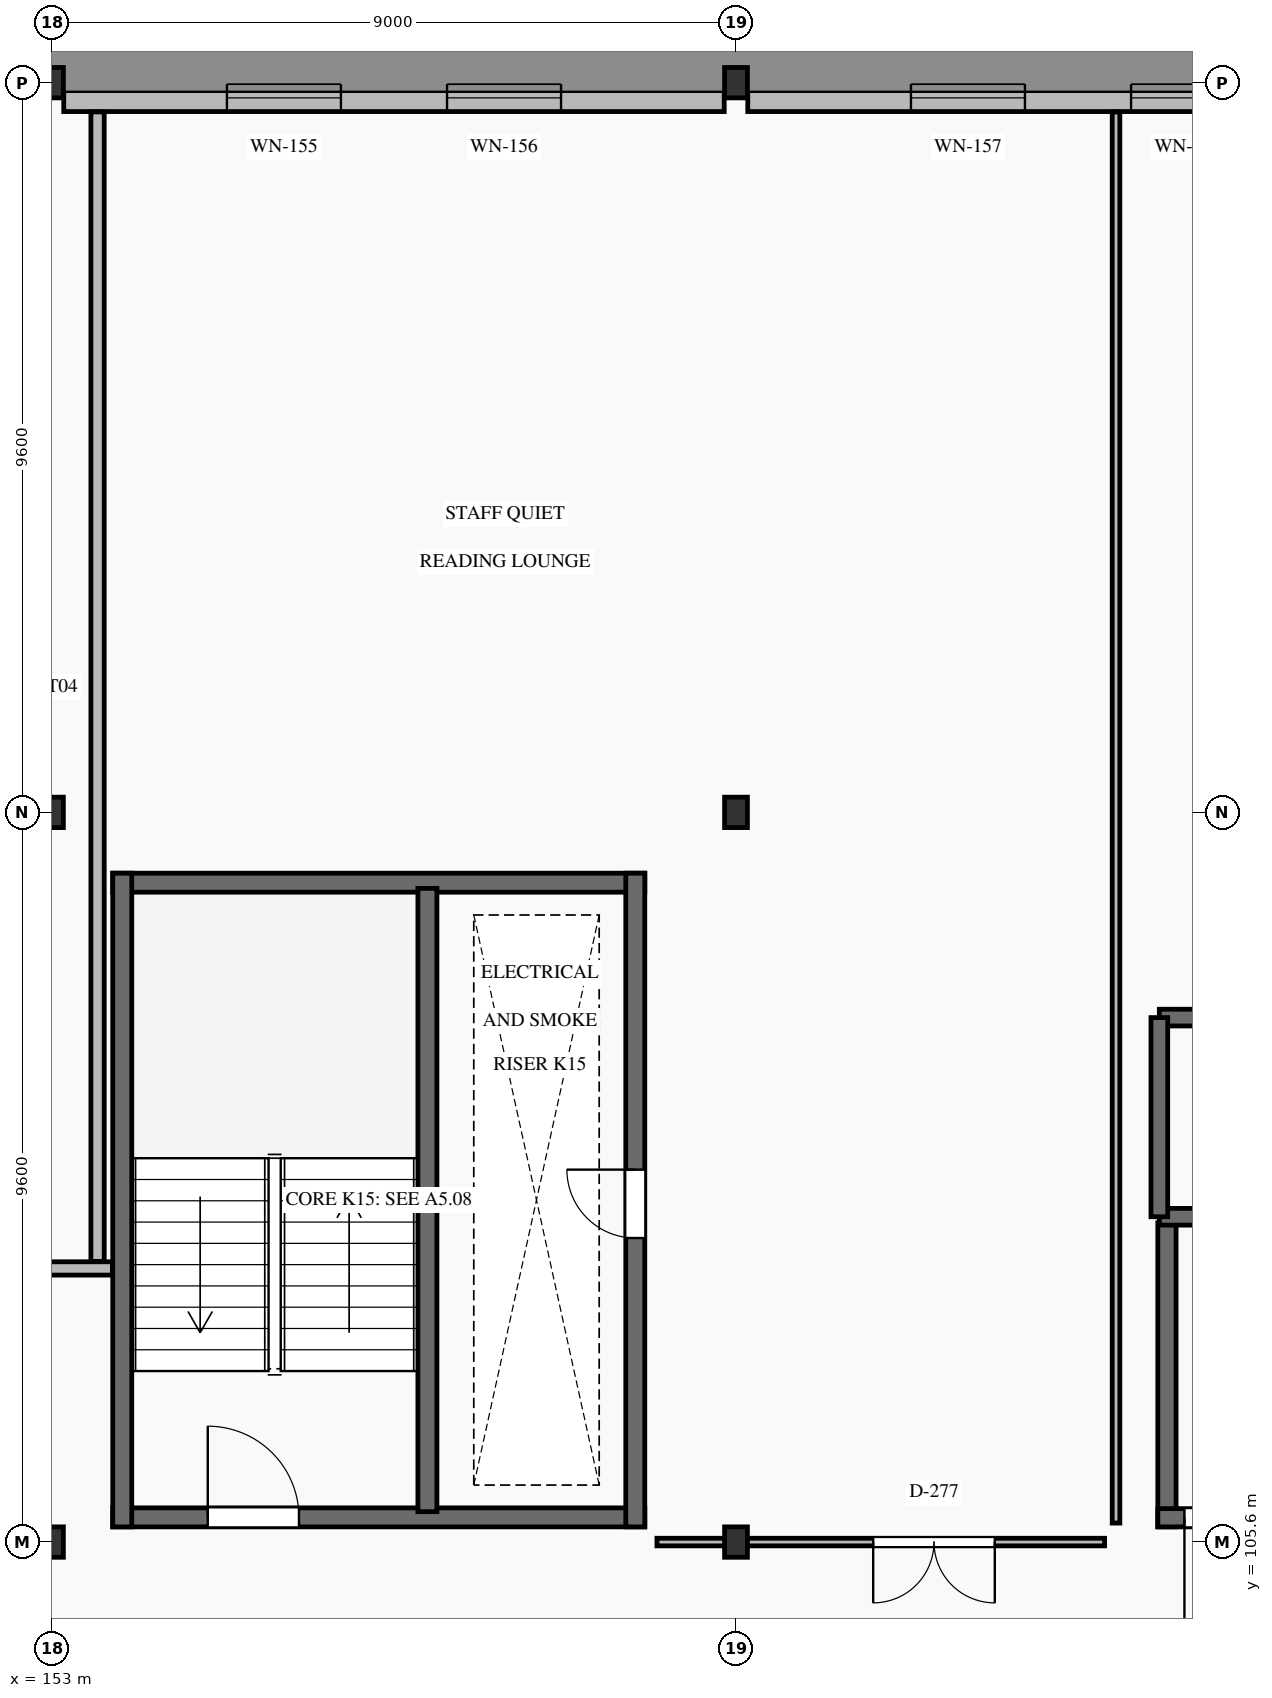
"""IFC4 building model, lengths in metres.
Left out: names, types, materials, properties, quantities, classifications, styles, units other than length and angle.
Written with IfcOpenShell. Run it as: python <this file> out.ifc"""

import sys

from ifc_helpers import new_model, si_unit, direction, frame, frame_2d, origin, origin_2d, place, context, subcontext, project, spatial, rectangle, i_section, extrude, element, fill, save


model = new_model("IFC4")
c1 = context("Model", 3, precision=1e-05, world=origin(), true_north=direction((0.0, 1.0)))
c2 = subcontext(c1, "Body", "Model", "MODEL_VIEW")
j1 = project(units=[si_unit("LENGTHUNIT", "METRE"), si_unit("PLANEANGLEUNIT", "RADIAN")], contexts=[c1])
p1 = place(None, origin())
s1 = spatial("IfcSite", under=j1, at=p1, CompositionType="ELEMENT")
p2 = place(p1, origin())
s2 = spatial("IfcBuilding", under=s1, at=p2, CompositionType="ELEMENT")
p3 = place(p2, frame((0.0, 0.0, 15.0)))
s3 = spatial("IfcBuildingStorey", under=s2, at=p3, CompositionType="ELEMENT", Elevation=15.0)
for number, where, z_axis, x_axis in (
    (1, (153.0, 105.6, 0.0), (0.0, 0.0, 1.0), (1.0, 0.0, 0.0)),
    (2, (153.0, 115.2, 0.0), (0.0, 0.0, 1.0), (1.0, 0.0, 0.0)),
    (3, (153.0, 124.8, 0.0), (0.0, 0.0, 1.0), (1.0, 0.0, 0.0)),
    (4, (162.0, 105.6, 0.0), (0.0, 0.0, 1.0), (1.0, 0.0, 0.0)),
    (5, (162.0, 115.2, 0.0), (0.0, 0.0, 1.0), (1.0, 0.0, 0.0)),
    (6, (162.0, 124.8, 0.0), (0.0, 0.0, 1.0), (1.0, 0.0, 0.0)),
):
    element("IfcColumn", number, at=place(p3, frame(where, z_axis=z_axis, x_axis=x_axis)), inside=s3, PredefinedType="COLUMN", context=c2, shape_type="SweptSolid", body=[
        extrude(i_section(OverallWidth=0.3, OverallDepth=0.4, WebThickness=0.013, FlangeThickness=0.024, FilletRadius=0.027, at=origin_2d()), origin(), (0.0, 0.0, 1.0), 3.9),
    ])
p4 = place(p3, frame((153.155, 124.6, 0.0), z_axis=(0.0, 0.0, 1.0), x_axis=(1.0, 0.0, 0.0)))
e7 = element("IfcWall", 7, at=p4, inside=s3, PredefinedType="SOLIDWALL", context=c2, shape_type="SweptSolid", body=[
    extrude(rectangle(XDim=8.69, YDim=0.36, at=frame_2d((4.345, 0.0))), origin(), (0.0, 0.0, 1.0), 3.36),
])
p5 = place(p4, frame((2.147, 0.0, 0.95)))
e8 = element("IfcOpeningElement", 8, at=p5, cuts=e7, PredefinedType="OPENING", context=c2, shape_type="SweptSolid", body=[
    extrude(rectangle(XDim=1.5, YDim=2.1, at=frame_2d((0.75, 1.05))), frame((0.0, 0.195, 0.0), z_axis=(0.0, -1.0, 0.0), x_axis=(1.0, 0.0, 0.0)), (0.0, 0.0, 1.0), 0.39),
])
p6 = place(p4, frame((5.043, 0.0, 0.95)))
e9 = element("IfcOpeningElement", 9, at=p6, cuts=e7, PredefinedType="OPENING", context=c2, shape_type="SweptSolid", body=[
    extrude(rectangle(XDim=1.5, YDim=2.1, at=frame_2d((0.75, 1.05))), frame((0.0, 0.195, 0.0), z_axis=(0.0, -1.0, 0.0), x_axis=(1.0, 0.0, 0.0)), (0.0, 0.0, 1.0), 0.39),
])
p7 = place(p3, frame((162.155, 124.6, 0.0), z_axis=(0.0, 0.0, 1.0), x_axis=(1.0, 0.0, 0.0)))
e10 = element("IfcWall", 10, at=p7, inside=s3, PredefinedType="SOLIDWALL", context=c2, shape_type="SweptSolid", body=[
    extrude(rectangle(XDim=8.69, YDim=0.36, at=frame_2d((4.345, 0.0))), origin(), (0.0, 0.0, 1.0), 3.36),
])
p8 = place(p7, frame((2.147, 0.0, 0.95)))
e11 = element("IfcOpeningElement", 11, at=p8, cuts=e10, PredefinedType="OPENING", context=c2, shape_type="SweptSolid", body=[
    extrude(rectangle(XDim=1.5, YDim=2.1, at=frame_2d((0.75, 1.05))), frame((0.0, 0.195, 0.0), z_axis=(0.0, -1.0, 0.0), x_axis=(1.0, 0.0, 0.0)), (0.0, 0.0, 1.0), 0.39),
])
p9 = place(p7, frame((5.043, 0.0, 0.95)))
e12 = element("IfcOpeningElement", 12, at=p9, cuts=e10, PredefinedType="OPENING", context=c2, shape_type="SweptSolid", body=[
    extrude(rectangle(XDim=1.5, YDim=2.1, at=frame_2d((0.75, 1.05))), frame((0.0, 0.195, 0.0), z_axis=(0.0, -1.0, 0.0), x_axis=(1.0, 0.0, 0.0)), (0.0, 0.0, 1.0), 0.39),
])
p10 = place(p3, frame((167.67, 105.8, 0.0), z_axis=(0.0, 0.0, 1.0), x_axis=(0.0, 1.0, 0.0)))
e13 = element("IfcWall", 13, at=p10, inside=s3, PredefinedType="SHEAR", context=c2, shape_type="SweptSolid", body=[
    extrude(rectangle(XDim=4.0, YDim=0.24, at=frame_2d((2.0, 0.0))), origin(), (0.0, 0.0, 1.0), 3.9),
])
p11 = place(p3, frame((167.55, 105.92, 0.0), z_axis=(0.0, 0.0, 1.0), x_axis=(1.0, 0.0, 0.0)))
e14 = element("IfcWall", 14, at=p11, inside=s3, PredefinedType="SHEAR", context=c2, shape_type="SweptSolid", body=[
    extrude(rectangle(XDim=4.2, YDim=0.24, at=frame_2d((2.1, 0.0))), origin(), (0.0, 0.0, 1.0), 3.9),
])
p12 = place(p11, frame((0.35, 0.0, 0.0)))
e15 = element("IfcOpeningElement", 15, at=p12, cuts=e14, PredefinedType="OPENING", context=c2, shape_type="SweptSolid", body=[
    extrude(rectangle(XDim=1.4, YDim=2.2, at=frame_2d((0.7, 1.1))), frame((0.0, 0.135, 0.0), z_axis=(0.0, -1.0, 0.0), x_axis=(1.0, 0.0, 0.0)), (0.0, 0.0, 1.0), 0.27),
])
p13 = place(p3, frame((153.8, 105.925, 0.0), z_axis=(0.0, 0.0, 1.0), x_axis=(1.0, 0.0, 0.0)))
e16 = element("IfcWall", 16, at=p13, inside=s3, PredefinedType="SHEAR", context=c2, shape_type="SweptSolid", body=[
    extrude(rectangle(XDim=7.0, YDim=0.25, at=frame_2d((3.5, 0.0))), origin(), (0.0, 0.0, 1.0), 3.9),
])
p14 = place(p13, frame((1.25, 0.0, 0.0)))
e17 = element("IfcOpeningElement", 17, at=p14, cuts=e16, PredefinedType="OPENING", context=c2, shape_type="SweptSolid", body=[
    extrude(rectangle(XDim=1.2, YDim=2.15, at=frame_2d((0.6, 1.075))), frame((0.0, 0.14, 0.0), z_axis=(0.0, -1.0, 0.0), x_axis=(1.0, 0.0, 0.0)), (0.0, 0.0, 1.0), 0.28),
])
p15 = place(p3, frame((153.8, 114.275, 0.0), z_axis=(0.0, 0.0, 1.0), x_axis=(1.0, 0.0, 0.0)))
e18 = element("IfcWall", 18, at=p15, inside=s3, PredefinedType="SHEAR", context=c2, shape_type="SweptSolid", body=[
    extrude(rectangle(XDim=7.0, YDim=0.25, at=frame_2d((3.5, 0.0))), origin(), (0.0, 0.0, 1.0), 3.9),
])
p16 = place(p3, frame((153.925, 105.8, 0.0), z_axis=(0.0, 0.0, 1.0), x_axis=(0.0, 1.0, 0.0)))
e19 = element("IfcWall", 19, at=p16, inside=s3, PredefinedType="SHEAR", context=c2, shape_type="SweptSolid", body=[
    extrude(rectangle(XDim=8.6, YDim=0.25, at=frame_2d((4.3, 0.0))), origin(), (0.0, 0.0, 1.0), 3.9),
])
p17 = place(p3, frame((160.675, 105.8, 0.0), z_axis=(0.0, 0.0, 1.0), x_axis=(0.0, 1.0, 0.0)))
e20 = element("IfcWall", 20, at=p17, inside=s3, PredefinedType="SHEAR", context=c2, shape_type="SweptSolid", body=[
    extrude(rectangle(XDim=8.6, YDim=0.25, at=frame_2d((4.3, 0.0))), origin(), (0.0, 0.0, 1.0), 3.9),
])
p18 = place(p17, frame((3.8, 0.0, 0.0)))
e21 = element("IfcOpeningElement", 21, at=p18, cuts=e20, PredefinedType="OPENING", context=c2, shape_type="SweptSolid", body=[
    extrude(rectangle(XDim=0.9, YDim=2.05, at=frame_2d((0.45, 1.025))), frame((0.0, 0.14, 0.0), z_axis=(0.0, -1.0, 0.0), x_axis=(1.0, 0.0, 0.0)), (0.0, 0.0, 1.0), 0.28),
])
p19 = place(p3, frame((157.94, 106.0, 0.0), z_axis=(0.0, 0.0, 1.0), x_axis=(0.0, 1.0, 0.0)))
e22 = element("IfcWall", 22, at=p19, inside=s3, PredefinedType="SHEAR", context=c2, shape_type="SweptSolid", body=[
    extrude(rectangle(XDim=8.2, YDim=0.25, at=frame_2d((4.1, 0.0))), origin(), (0.0, 0.0, 1.0), 3.9),
])
p20 = place(p3, frame((167.57, 109.88, 0.0), z_axis=(0.0, 0.0, 1.0), x_axis=(1.0, 0.0, 0.0)))
e23 = element("IfcWall", 23, at=p20, inside=s3, PredefinedType="SHEAR", context=c2, shape_type="SweptSolid", body=[
    extrude(rectangle(XDim=4.16, YDim=0.22, at=frame_2d((2.08, 0.0))), origin(), (0.0, 0.0, 1.0), 3.9),
])
p21 = place(p20, frame((1.53, 0.0, 0.0)))
e24 = element("IfcOpeningElement", 24, at=p21, cuts=e23, PredefinedType="OPENING", context=c2, shape_type="SweptSolid", body=[
    extrude(rectangle(XDim=1.1, YDim=2.15, at=frame_2d((0.55, 1.075))), frame((0.0, 0.125, 0.0), z_axis=(0.0, -1.0, 0.0), x_axis=(1.0, 0.0, 0.0)), (0.0, 0.0, 1.0), 0.25),
])
p22 = place(p3, frame((167.57, 112.5, 0.0), z_axis=(0.0, 0.0, 1.0), x_axis=(1.0, 0.0, 0.0)))
e25 = element("IfcWall", 25, at=p22, inside=s3, PredefinedType="SHEAR", context=c2, shape_type="SweptSolid", body=[
    extrude(rectangle(XDim=4.16, YDim=0.22, at=frame_2d((2.08, 0.0))), origin(), (0.0, 0.0, 1.0), 3.9),
])
p23 = place(p3, frame((167.57, 109.88, 0.0), z_axis=(0.0, 0.0, 1.0), x_axis=(0.0, 1.0, 0.0)))
e26 = element("IfcWall", 26, at=p23, inside=s3, PredefinedType="SHEAR", context=c2, shape_type="SweptSolid", body=[
    extrude(rectangle(XDim=2.62, YDim=0.22, at=frame_2d((1.31, 0.0))), origin(), (0.0, 0.0, 1.0), 3.9),
])
p24 = place(p3, frame((138.255, 109.2, 0.0), z_axis=(0.0, 0.0, 1.0), x_axis=(1.0, 0.0, 0.0)))
e27 = element("IfcWall", 27, at=p24, inside=s3, PredefinedType="PARTITIONING", context=c2, shape_type="SweptSolid", body=[
    extrude(rectangle(XDim=15.54, YDim=0.175, at=frame_2d((7.77, 0.0))), origin(), (0.0, 0.0, 1.0), 3.64),
])
p25 = place(p24, frame((7.245, 0.0, 0.0)))
e28 = element("IfcOpeningElement", 28, at=p25, cuts=e27, PredefinedType="OPENING", context=c2, shape_type="SweptSolid", body=[
    extrude(rectangle(XDim=1.6, YDim=2.25, at=frame_2d((0.8, 1.125))), frame((0.0, 0.103, 0.0), z_axis=(0.0, -1.0, 0.0), x_axis=(1.0, 0.0, 0.0)), (0.0, 0.0, 1.0), 0.205),
])
p26 = place(p3, frame((160.96, 105.6, 0.0), z_axis=(0.0, 0.0, 1.0), x_axis=(1.0, 0.0, 0.0)))
e29 = element("IfcWall", 29, at=p26, inside=s3, PredefinedType="PARTITIONING", context=c2, shape_type="SweptSolid", body=[
    extrude(rectangle(XDim=5.89, YDim=0.1, at=frame_2d((2.945, 0.0))), origin(), (0.0, 0.0, 1.0), 3.29),
])
p27 = place(p26, frame((2.845, 0.0, 0.0)))
e30 = element("IfcOpeningElement", 30, at=p27, cuts=e29, PredefinedType="OPENING", context=c2, shape_type="SweptSolid", body=[
    extrude(rectangle(XDim=1.6, YDim=2.25, at=frame_2d((0.8, 1.125))), frame((0.0, 0.065, 0.0), z_axis=(0.0, -1.0, 0.0), x_axis=(1.0, 0.0, 0.0)), (0.0, 0.0, 1.0), 0.13),
])
p28 = place(p3, frame((153.6, 109.292, 0.0), z_axis=(0.0, 0.0, 1.0), x_axis=(0.0, 1.0, 0.0)))
e31 = element("IfcWall", 31, at=p28, inside=s3, PredefinedType="PARTITIONING", context=c2, shape_type="SweptSolid", body=[
    extrude(rectangle(XDim=15.123, YDim=0.175, at=frame_2d((7.561, 0.0))), origin(), (0.0, 0.0, 1.0), 3.64),
])
p29 = place(p3, frame((167.0, 105.85, 0.0), z_axis=(0.0, 0.0, 1.0), x_axis=(0.0, 1.0, 0.0)))
e32 = element("IfcWall", 32, at=p29, inside=s3, PredefinedType="PARTITIONING", context=c2, shape_type="SweptSolid", body=[
    extrude(rectangle(XDim=18.565, YDim=0.1, at=frame_2d((9.282, 0.0))), origin(), (0.0, 0.0, 1.0), 3.64),
])
p30 = place(p5, origin())
e33 = element("IfcWindow", 33, at=p30, inside=s3, PartitioningType="SINGLE_PANEL", PredefinedType="WINDOW", context=c2, shape_type="SweptSolid", body=[
    extrude(rectangle(XDim=1.5, YDim=2.1, at=frame_2d((0.75, 1.05))), frame((0.0, 0.03, 0.0), z_axis=(0.0, -1.0, 0.0), x_axis=(1.0, 0.0, 0.0)), (0.0, 0.0, 1.0), 0.06),
])
fill(e8, e33)
p31 = place(p6, origin())
e34 = element("IfcWindow", 34, at=p31, inside=s3, PartitioningType="SINGLE_PANEL", PredefinedType="WINDOW", context=c2, shape_type="SweptSolid", body=[
    extrude(rectangle(XDim=1.5, YDim=2.1, at=frame_2d((0.75, 1.05))), frame((0.0, 0.03, 0.0), z_axis=(0.0, -1.0, 0.0), x_axis=(1.0, 0.0, 0.0)), (0.0, 0.0, 1.0), 0.06),
])
fill(e9, e34)
p32 = place(p8, origin())
e35 = element("IfcWindow", 35, at=p32, inside=s3, PartitioningType="SINGLE_PANEL", PredefinedType="WINDOW", context=c2, shape_type="SweptSolid", body=[
    extrude(rectangle(XDim=1.5, YDim=2.1, at=frame_2d((0.75, 1.05))), frame((0.0, 0.03, 0.0), z_axis=(0.0, -1.0, 0.0), x_axis=(1.0, 0.0, 0.0)), (0.0, 0.0, 1.0), 0.06),
])
fill(e11, e35)
p33 = place(p9, origin())
e36 = element("IfcWindow", 36, at=p33, inside=s3, PartitioningType="SINGLE_PANEL", PredefinedType="WINDOW", context=c2, shape_type="SweptSolid", body=[
    extrude(rectangle(XDim=1.5, YDim=2.1, at=frame_2d((0.75, 1.05))), frame((0.0, 0.03, 0.0), z_axis=(0.0, -1.0, 0.0), x_axis=(1.0, 0.0, 0.0)), (0.0, 0.0, 1.0), 0.06),
])
fill(e12, e36)
p34 = place(p12, frame((1.4, 0.0, 0.0), z_axis=(0.0, 0.0, 1.0), x_axis=(-1.0, 0.0, 0.0)))
e37 = element("IfcDoor", 37, at=p34, inside=s3, OperationType="SINGLE_SWING_LEFT", PredefinedType="DOOR", context=c2, shape_type="SweptSolid", body=[
    extrude(rectangle(XDim=1.4, YDim=2.2, at=frame_2d((0.7, 1.1))), frame((0.0, 0.025, 0.0), z_axis=(0.0, -1.0, 0.0), x_axis=(1.0, 0.0, 0.0)), (0.0, 0.0, 1.0), 0.05),
])
fill(e15, e37)
p35 = place(p14, origin())
e38 = element("IfcDoor", 38, at=p35, inside=s3, OperationType="SINGLE_SWING_LEFT", PredefinedType="DOOR", context=c2, shape_type="SweptSolid", body=[
    extrude(rectangle(XDim=1.2, YDim=2.15, at=frame_2d((0.6, 1.075))), frame((0.0, 0.025, 0.0), z_axis=(0.0, -1.0, 0.0), x_axis=(1.0, 0.0, 0.0)), (0.0, 0.0, 1.0), 0.05),
])
fill(e17, e38)
p36 = place(p18, origin())
e39 = element("IfcDoor", 39, at=p36, inside=s3, OperationType="SINGLE_SWING_RIGHT", PredefinedType="DOOR", context=c2, shape_type="SweptSolid", body=[
    extrude(rectangle(XDim=0.9, YDim=2.05, at=frame_2d((0.45, 1.025))), frame((0.0, 0.025, 0.0), z_axis=(0.0, -1.0, 0.0), x_axis=(1.0, 0.0, 0.0)), (0.0, 0.0, 1.0), 0.05),
])
fill(e21, e39)
p37 = place(p27, frame((1.6, 0.0, 0.0), z_axis=(0.0, 0.0, 1.0), x_axis=(-1.0, 0.0, 0.0)))
e40 = element("IfcDoor", 40, at=p37, inside=s3, OperationType="DOUBLE_DOOR_SINGLE_SWING", PredefinedType="DOOR", context=c2, shape_type="SweptSolid", body=[
    extrude(rectangle(XDim=1.6, YDim=2.25, at=frame_2d((0.8, 1.125))), frame((0.0, 0.025, 0.0), z_axis=(0.0, -1.0, 0.0), x_axis=(1.0, 0.0, 0.0)), (0.0, 0.0, 1.0), 0.05),
])
fill(e30, e40)
save(model, sys.argv[1])
